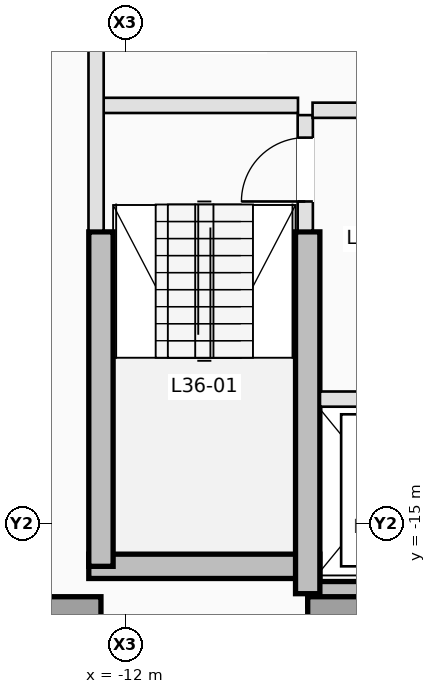
"""IFC4 building model, lengths in metres.
Left out: names, types, materials, properties, quantities, classifications, styles, units other than length and angle.
Written with IfcOpenShell. Run it as: python <this file> out.ifc"""

import sys

from ifc_helpers import new_model, si_unit, direction, frame, frame_2d, origin, origin_2d, place, context, subcontext, project, spatial, rectangle, extrude, element, fill, save


model = new_model("IFC4")
c1 = context("Model", 3, precision=1e-05, world=origin(), true_north=direction((0.0, 1.0)))
c2 = subcontext(c1, "Body", "Model", "MODEL_VIEW")
j1 = project(units=[si_unit("LENGTHUNIT", "METRE"), si_unit("PLANEANGLEUNIT", "RADIAN")], contexts=[c1])
p1 = place(None, origin())
s1 = spatial("IfcSite", under=j1, at=p1, CompositionType="ELEMENT")
p2 = place(p1, origin())
s2 = spatial("IfcBuilding", under=s1, at=p2, CompositionType="ELEMENT")
p3 = place(p2, frame((0.0, 0.0, 133.5)))
s3 = spatial("IfcBuildingStorey", under=s2, at=p3, CompositionType="ELEMENT", Elevation=133.5)
p4 = place(p3, frame((-12.6, -15.7, 0.0), z_axis=(0.0, 0.0, 1.0), x_axis=(1.0, 0.0, 0.0)))
e1 = element("IfcWall", 1, at=p4, inside=s3, PredefinedType="SHEAR", context=c2, shape_type="SweptSolid", body=[
    extrude(rectangle(XDim=3.8, YDim=0.4, at=frame_2d((1.9, 0.0))), origin(), (0.0, 0.0, 1.0), 3.5),
])
p5 = place(p3, frame((-9.0, -16.15, 0.0), z_axis=(0.0, 0.0, 1.0), x_axis=(1.0, 0.0, 0.0)))
e2 = element("IfcWall", 2, at=p5, inside=s3, PredefinedType="SHEAR", context=c2, shape_type="SweptSolid", body=[
    extrude(rectangle(XDim=5.25, YDim=0.4, at=frame_2d((2.625, 0.0))), origin(), (0.0, 0.0, 1.0), 3.5),
])
p6 = place(p3, frame((-12.4, -15.7, 0.0), z_axis=(0.0, 0.0, 1.0), x_axis=(0.0, 1.0, 0.0)))
e3 = element("IfcWall", 3, at=p6, inside=s3, PredefinedType="SHEAR", context=c2, shape_type="SweptSolid", body=[
    extrude(rectangle(XDim=5.5, YDim=0.4, at=frame_2d((2.75, 0.0))), origin(), (0.0, 0.0, 1.0), 3.5),
])
p7 = place(p3, frame((-9.0, -16.15, 0.0), z_axis=(0.0, 0.0, 1.0), x_axis=(0.0, 1.0, 0.0)))
e4 = element("IfcWall", 4, at=p7, inside=s3, PredefinedType="SHEAR", context=c2, shape_type="SweptSolid", body=[
    extrude(rectangle(XDim=5.95, YDim=0.4, at=frame_2d((2.975, 0.0))), origin(), (0.0, 0.0, 1.0), 3.5),
])
for number, where, z_axis, x_axis in (
    (5, (-12.95, -16.75, 0.0), (0.0, 0.0, 1.0), (1.0, 0.0, 0.0)),
    (6, (-8.45, -16.75, 0.0), (0.0, 0.0, 1.0), (1.0, 0.0, 0.0)),
):
    element("IfcColumn", number, at=place(p3, frame(where, z_axis=z_axis, x_axis=x_axis)), inside=s3, PredefinedType="COLUMN", context=c2, shape_type="SweptSolid", body=[
        extrude(rectangle(XDim=1.1, YDim=1.1, at=origin_2d()), origin(), (0.0, 0.0, 1.0), 3.5),
    ])
p8 = place(p3, frame((-9.04, -10.18, 0.0), z_axis=(0.0, 0.0, 1.0), x_axis=(0.0, 1.0, 0.0)))
e7 = element("IfcWall", 7, at=p8, inside=s3, PredefinedType="PARTITIONING", context=c2, shape_type="SweptSolid", body=[
    extrude(rectangle(XDim=1.9, YDim=0.25, at=frame_2d((0.95, 0.0))), origin(), (0.0, 0.0, 1.0), 3.25),
])
p9 = place(p8, frame((0.48, 0.0, 0.0)))
e8 = element("IfcOpeningElement", 8, at=p9, cuts=e7, PredefinedType="OPENING", context=c2, shape_type="SweptSolid", body=[
    extrude(rectangle(XDim=1.05, YDim=2.15, at=frame_2d((0.525, 1.075))), frame((0.0, 0.135, 0.0), z_axis=(0.0, -1.0, 0.0), x_axis=(1.0, 0.0, 0.0)), (0.0, 0.0, 1.0), 0.27),
])
p10 = place(p3, frame((-12.38, -8.12, 0.0), z_axis=(0.0, 0.0, 1.0), x_axis=(1.0, 0.0, 0.0)))
e9 = element("IfcWall", 9, at=p10, inside=s3, PredefinedType="PARTITIONING", context=c2, shape_type="SweptSolid", body=[
    extrude(rectangle(XDim=3.22, YDim=0.25, at=frame_2d((1.61, 0.0))), origin(), (0.0, 0.0, 1.0), 3.25),
])
p11 = place(p3, frame((-12.48, -10.18, 0.0), z_axis=(0.0, 0.0, 1.0), x_axis=(0.0, 1.0, 0.0)))
e10 = element("IfcWall", 10, at=p11, inside=s3, PredefinedType="PARTITIONING", context=c2, shape_type="SweptSolid", body=[
    extrude(rectangle(XDim=4.828, YDim=0.25, at=frame_2d((2.414, 0.0))), origin(), (0.0, 0.0, 1.0), 3.25),
])
p12 = place(p3, frame((-8.798, -12.95, 0.0), z_axis=(0.0, 0.0, 1.0), x_axis=(1.0, 0.0, 0.0)))
e11 = element("IfcWall", 11, at=p12, inside=s3, PredefinedType="PARTITIONING", context=c2, shape_type="SweptSolid", body=[
    extrude(rectangle(XDim=5.118, YDim=0.25, at=frame_2d((2.559, 0.0))), origin(), (0.0, 0.0, 1.0), 3.25),
])
p13 = place(p12, frame((0.698, 0.0, 0.0)))
e12 = element("IfcOpeningElement", 12, at=p13, cuts=e11, PredefinedType="OPENING", context=c2, shape_type="SweptSolid", body=[
    extrude(rectangle(XDim=1.1, YDim=2.15, at=frame_2d((0.55, 1.075))), frame((0.0, 0.135, 0.0), z_axis=(0.0, -1.0, 0.0), x_axis=(1.0, 0.0, 0.0)), (0.0, 0.0, 1.0), 0.27),
])
p14 = place(p12, frame((2.598, 0.0, 0.0)))
e13 = element("IfcOpeningElement", 13, at=p14, cuts=e11, PredefinedType="OPENING", context=c2, shape_type="SweptSolid", body=[
    extrude(rectangle(XDim=0.88, YDim=2.1, at=frame_2d((0.44, 1.05))), frame((0.0, 0.135, 0.0), z_axis=(0.0, -1.0, 0.0), x_axis=(1.0, 0.0, 0.0)), (0.0, 0.0, 1.0), 0.27),
])
p15 = place(p12, frame((3.998, 0.0, 0.0)))
e14 = element("IfcOpeningElement", 14, at=p15, cuts=e11, PredefinedType="OPENING", context=c2, shape_type="SweptSolid", body=[
    extrude(rectangle(XDim=0.88, YDim=2.1, at=frame_2d((0.44, 1.05))), frame((0.0, 0.135, 0.0), z_axis=(0.0, -1.0, 0.0), x_axis=(1.0, 0.0, 0.0)), (0.0, 0.0, 1.0), 0.27),
])
p16 = place(p3, frame((-8.92, -8.2, 0.0), z_axis=(0.0, 0.0, 1.0), x_axis=(1.0, 0.0, 0.0)))
e15 = element("IfcWall", 15, at=p16, inside=s3, PredefinedType="PARTITIONING", context=c2, shape_type="SweptSolid", body=[
    extrude(rectangle(XDim=5.24, YDim=0.25, at=frame_2d((2.62, 0.0))), origin(), (0.0, 0.0, 1.0), 3.25),
])
p17 = place(p9, origin())
e16 = element("IfcDoor", 16, at=p17, inside=s3, OperationType="SINGLE_SWING_LEFT", PredefinedType="DOOR", context=c2, shape_type="SweptSolid", body=[
    extrude(rectangle(XDim=1.05, YDim=2.15, at=frame_2d((0.525, 1.075))), frame((0.0, 0.025, 0.0), z_axis=(0.0, -1.0, 0.0), x_axis=(1.0, 0.0, 0.0)), (0.0, 0.0, 1.0), 0.05),
])
fill(e8, e16)
save(model, sys.argv[1])
